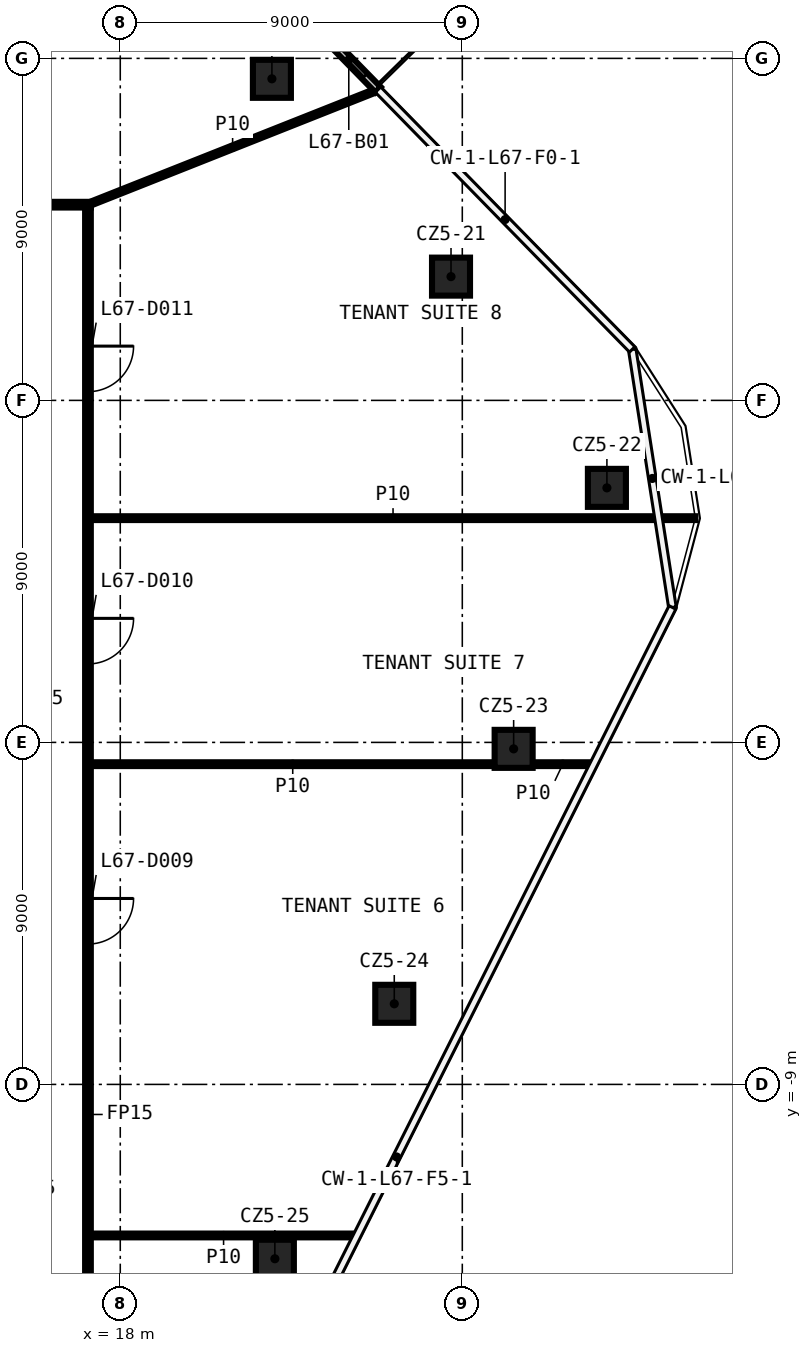
"""IFC4 building model, lengths in metres.
Left out: names, types, materials, properties, quantities, classifications, styles, units other than length and angle.
Written with IfcOpenShell. Run it as: python <this file> out.ifc"""

import sys

from ifc_helpers import new_model, si_unit, direction, frame, frame_2d, origin, origin_2d, place, context, subcontext, project, spatial, rectangle, extrude, element, fill, save


model = new_model("IFC4")
c1 = context("Model", 3, precision=1e-05, world=origin(), true_north=direction((0.0, 1.0)))
c2 = subcontext(c1, "Body", "Model", "MODEL_VIEW")
j1 = project(units=[si_unit("LENGTHUNIT", "METRE"), si_unit("PLANEANGLEUNIT", "RADIAN")], contexts=[c1])
p1 = place(None, origin())
s1 = spatial("IfcSite", under=j1, at=p1, CompositionType="ELEMENT")
p2 = place(p1, origin())
s2 = spatial("IfcBuilding", under=s1, at=p2, CompositionType="ELEMENT")
p3 = place(p2, frame((0.0, 0.0, 315.2)))
s3 = spatial("IfcBuildingStorey", under=s2, at=p3, CompositionType="ELEMENT", Elevation=315.2)
for number, where, z_axis, x_axis in (
    (1, (21.99, 17.462, 0.0), (0.0, 0.0, 1.0), (1.0, 0.0, 0.0)),
    (2, (26.703, 12.257, 0.0), (0.0, 0.0, 1.0), (1.0, 0.0, 0.0)),
    (3, (30.805, 6.698, 0.0), (0.0, 0.0, 1.0), (1.0, 0.0, 0.0)),
    (4, (28.351, -0.17, 0.0), (0.0, 0.0, 1.0), (1.0, 0.0, 0.0)),
    (5, (25.21, -6.879, 0.0), (0.0, 0.0, 1.0), (1.0, 0.0, 0.0)),
    (6, (22.068, -13.588, 0.0), (0.0, 0.0, 1.0), (1.0, 0.0, 0.0)),
):
    element("IfcColumn", number, at=place(p3, frame(where, z_axis=z_axis, x_axis=x_axis)), inside=s3, PredefinedType="COLUMN", context=c2, shape_type="SweptSolid", body=[
        extrude(rectangle(XDim=1.0, YDim=1.0, at=origin_2d()), origin(), (0.0, 0.0, 1.0), 3.82),
    ])
p4 = place(p3, frame((17.225, -12.975, 0.0), z_axis=(0.0, 0.0, 1.0), x_axis=(1.0, 0.0, 0.0)))
e7 = element("IfcWall", 7, at=p4, inside=s3, PredefinedType="PARTITIONING", context=c2, shape_type="SweptSolid", body=[
    extrude(rectangle(XDim=6.987, YDim=0.1, at=frame_2d((3.493, 0.0))), origin(), (0.0, 0.0, 1.0), 3.82),
])
p5 = place(p3, frame((17.225, -0.573, 0.0), z_axis=(0.0, 0.0, 1.0), x_axis=(1.0, 0.0, 0.0)))
e8 = element("IfcWall", 8, at=p5, inside=s3, PredefinedType="PARTITIONING", context=c2, shape_type="SweptSolid", body=[
    extrude(rectangle(XDim=10.626, YDim=0.1, at=frame_2d((5.313, 0.0))), origin(), (0.0, 0.0, 1.0), 3.82),
])
p6 = place(p3, frame((28.851, -0.573, 0.0), z_axis=(0.0, 0.0, 1.0), x_axis=(1.0, 0.0, 0.0)))
e9 = element("IfcWall", 9, at=p6, inside=s3, PredefinedType="PARTITIONING", context=c2, shape_type="SweptSolid", body=[
    extrude(rectangle(XDim=1.586, YDim=0.1, at=frame_2d((0.793, 0.0))), origin(), (0.0, 0.0, 1.0), 3.82),
])
p7 = place(p3, frame((17.225, 5.901, 0.0), z_axis=(0.0, 0.0, 1.0), x_axis=(1.0, 0.0, 0.0)))
e10 = element("IfcWall", 10, at=p7, inside=s3, PredefinedType="PARTITIONING", context=c2, shape_type="SweptSolid", body=[
    extrude(rectangle(XDim=15.905, YDim=0.1, at=frame_2d((7.953, 0.0))), origin(), (0.0, 0.0, 1.0), 3.82),
])
p8 = place(p3, frame((-17.225, 14.15, 0.0), z_axis=(0.0, 0.0, 1.0), x_axis=(1.0, 0.0, 0.0)))
e11 = element("IfcWall", 11, at=p8, inside=s3, PredefinedType="PARTITIONING", context=c2, shape_type="SweptSolid", body=[
    extrude(rectangle(XDim=34.45, YDim=0.15, at=frame_2d((17.225, 0.0))), origin(), (0.0, 0.0, 1.0), 3.82),
])
p9 = place(p8, frame((31.607, 0.0, 0.0)))
e12 = element("IfcOpeningElement", 12, at=p9, cuts=e11, PredefinedType="OPENING", context=c2, shape_type="SweptSolid", body=[
    extrude(rectangle(XDim=1.2, YDim=2.1, at=frame_2d((0.6, 1.05))), frame((0.0, 0.085, 0.0), z_axis=(0.0, -1.0, 0.0), x_axis=(1.0, 0.0, 0.0)), (0.0, 0.0, 1.0), 0.17),
])
p10 = place(p8, frame((25.936, 0.0, 0.0)))
e13 = element("IfcOpeningElement", 13, at=p10, cuts=e11, PredefinedType="OPENING", context=c2, shape_type="SweptSolid", body=[
    extrude(rectangle(XDim=1.2, YDim=2.1, at=frame_2d((0.6, 1.05))), frame((0.0, 0.085, 0.0), z_axis=(0.0, -1.0, 0.0), x_axis=(1.0, 0.0, 0.0)), (0.0, 0.0, 1.0), 0.17),
])
p11 = place(p8, frame((17.707, 0.0, 0.0)))
e14 = element("IfcOpeningElement", 14, at=p11, cuts=e11, PredefinedType="OPENING", context=c2, shape_type="SweptSolid", body=[
    extrude(rectangle(XDim=1.2, YDim=2.1, at=frame_2d((0.6, 1.05))), frame((0.0, 0.085, 0.0), z_axis=(0.0, -1.0, 0.0), x_axis=(1.0, 0.0, 0.0)), (0.0, 0.0, 1.0), 0.17),
])
p12 = place(p8, frame((10.617, 0.0, 0.0)))
e15 = element("IfcOpeningElement", 15, at=p12, cuts=e11, PredefinedType="OPENING", context=c2, shape_type="SweptSolid", body=[
    extrude(rectangle(XDim=1.2, YDim=2.1, at=frame_2d((0.6, 1.05))), frame((0.0, 0.085, 0.0), z_axis=(0.0, -1.0, 0.0), x_axis=(1.0, 0.0, 0.0)), (0.0, 0.0, 1.0), 0.17),
])
p13 = place(p8, frame((5.896, 0.0, 0.0)))
e16 = element("IfcOpeningElement", 16, at=p13, cuts=e11, PredefinedType="OPENING", context=c2, shape_type="SweptSolid", body=[
    extrude(rectangle(XDim=1.2, YDim=2.1, at=frame_2d((0.6, 1.05))), frame((0.0, 0.085, 0.0), z_axis=(0.0, -1.0, 0.0), x_axis=(1.0, 0.0, 0.0)), (0.0, 0.0, 1.0), 0.17),
])
p14 = place(p8, frame((1.506, 0.0, 0.0)))
e17 = element("IfcOpeningElement", 17, at=p14, cuts=e11, PredefinedType="OPENING", context=c2, shape_type="SweptSolid", body=[
    extrude(rectangle(XDim=1.2, YDim=2.1, at=frame_2d((0.6, 1.05))), frame((0.0, 0.085, 0.0), z_axis=(0.0, -1.0, 0.0), x_axis=(1.0, 0.0, 0.0)), (0.0, 0.0, 1.0), 0.17),
])
p15 = place(p3, frame((17.15, 14.15, 0.0), z_axis=(0.0, 0.0, 1.0), x_axis=(0.92958283513, 0.368613283308, 0.0)))
e18 = element("IfcWall", 18, at=p15, inside=s3, PredefinedType="PARTITIONING", context=c2, shape_type="SweptSolid", body=[
    extrude(rectangle(XDim=8.189, YDim=0.1, at=frame_2d((4.094, 0.0))), origin(), (0.0, 0.0, 1.0), 3.82),
])
p16 = place(p3, frame((17.15, 14.075, 0.0), z_axis=(0.0, 0.0, 1.0), x_axis=(0.0, -1.0, 0.0)))
e19 = element("IfcWall", 19, at=p16, inside=s3, PredefinedType="PARTITIONING", context=c2, shape_type="SweptSolid", body=[
    extrude(rectangle(XDim=28.15, YDim=0.15, at=frame_2d((14.075, 0.0))), origin(), (0.0, 0.0, 1.0), 3.82),
])
p17 = place(p16, frame((18.182, 0.0, 0.0)))
e20 = element("IfcOpeningElement", 20, at=p17, cuts=e19, PredefinedType="OPENING", context=c2, shape_type="SweptSolid", body=[
    extrude(rectangle(XDim=1.2, YDim=2.1, at=frame_2d((0.6, 1.05))), frame((0.0, 0.085, 0.0), z_axis=(0.0, -1.0, 0.0), x_axis=(1.0, 0.0, 0.0)), (0.0, 0.0, 1.0), 0.17),
])
p18 = place(p16, frame((10.811, 0.0, 0.0)))
e21 = element("IfcOpeningElement", 21, at=p18, cuts=e19, PredefinedType="OPENING", context=c2, shape_type="SweptSolid", body=[
    extrude(rectangle(XDim=1.2, YDim=2.1, at=frame_2d((0.6, 1.05))), frame((0.0, 0.085, 0.0), z_axis=(0.0, -1.0, 0.0), x_axis=(1.0, 0.0, 0.0)), (0.0, 0.0, 1.0), 0.17),
])
p19 = place(p16, frame((3.647, 0.0, 0.0)))
e22 = element("IfcOpeningElement", 22, at=p19, cuts=e19, PredefinedType="OPENING", context=c2, shape_type="SweptSolid", body=[
    extrude(rectangle(XDim=1.2, YDim=2.1, at=frame_2d((0.6, 1.05))), frame((0.0, 0.085, 0.0), z_axis=(0.0, -1.0, 0.0), x_axis=(1.0, 0.0, 0.0)), (0.0, 0.0, 1.0), 0.17),
])
p20 = place(p3, frame((24.782, 17.177, 0.0), z_axis=(0.0, 0.0, 1.0), x_axis=(-0.699351369698, 0.714778050657, 0.0)))
e23 = element("IfcWall", 23, at=p20, inside=s3, PredefinedType="SOLIDWALL", context=c2, shape_type="SweptSolid", body=[
    extrude(rectangle(XDim=9.575, YDim=0.2, at=frame_2d((4.787, 0.0))), origin(), (0.0, 0.0, 1.0), 3.82),
])
p21 = place(p20, frame((2.0, 0.0, 0.6)))
e24 = element("IfcOpeningElement", 24, at=p21, cuts=e23, PredefinedType="OPENING", context=c2, shape_type="SweptSolid", body=[
    extrude(rectangle(XDim=1.6, YDim=2.4, at=frame_2d((0.8, 1.2))), frame((0.0, 0.11, 0.0), z_axis=(0.0, -1.0, 0.0), x_axis=(1.0, 0.0, 0.0)), (0.0, 0.0, 1.0), 0.22),
])
p22 = place(p20, frame((0.5, 0.0, 0.0)))
e25 = element("IfcOpeningElement", 25, at=p22, cuts=e23, PredefinedType="OPENING", context=c2, shape_type="SweptSolid", body=[
    extrude(rectangle(XDim=1.2, YDim=2.4, at=frame_2d((0.6, 1.2))), frame((0.0, 0.11, 0.0), z_axis=(0.0, -1.0, 0.0), x_axis=(1.0, 0.0, 0.0)), (0.0, 0.0, 1.0), 0.22),
])
p23 = place(p20, frame((6.787, 0.0, 0.6)))
e26 = element("IfcOpeningElement", 26, at=p23, cuts=e23, PredefinedType="OPENING", context=c2, shape_type="SweptSolid", body=[
    extrude(rectangle(XDim=1.6, YDim=2.4, at=frame_2d((0.8, 1.2))), frame((0.0, 0.11, 0.0), z_axis=(0.0, -1.0, 0.0), x_axis=(1.0, 0.0, 0.0)), (0.0, 0.0, 1.0), 0.22),
])
p24 = place(p20, frame((5.287, 0.0, 0.0)))
e27 = element("IfcOpeningElement", 27, at=p24, cuts=e23, PredefinedType="OPENING", context=c2, shape_type="SweptSolid", body=[
    extrude(rectangle(XDim=1.2, YDim=2.4, at=frame_2d((0.6, 1.2))), frame((0.0, 0.11, 0.0), z_axis=(0.0, -1.0, 0.0), x_axis=(1.0, 0.0, 0.0)), (0.0, 0.0, 1.0), 0.22),
])
p25 = place(p17, origin())
e28 = element("IfcDoor", 28, at=p25, inside=s3, OperationType="SINGLE_SWING_RIGHT", PredefinedType="DOOR", context=c2, shape_type="SweptSolid", body=[
    extrude(rectangle(XDim=1.2, YDim=2.1, at=frame_2d((0.6, 1.05))), frame((0.0, 0.025, 0.0), z_axis=(0.0, -1.0, 0.0), x_axis=(1.0, 0.0, 0.0)), (0.0, 0.0, 1.0), 0.05),
])
fill(e20, e28)
p26 = place(p18, origin())
e29 = element("IfcDoor", 29, at=p26, inside=s3, OperationType="SINGLE_SWING_LEFT", PredefinedType="DOOR", context=c2, shape_type="SweptSolid", body=[
    extrude(rectangle(XDim=1.2, YDim=2.1, at=frame_2d((0.6, 1.05))), frame((0.0, 0.025, 0.0), z_axis=(0.0, -1.0, 0.0), x_axis=(1.0, 0.0, 0.0)), (0.0, 0.0, 1.0), 0.05),
])
fill(e21, e29)
p27 = place(p19, origin())
e30 = element("IfcDoor", 30, at=p27, inside=s3, OperationType="SINGLE_SWING_RIGHT", PredefinedType="DOOR", context=c2, shape_type="SweptSolid", body=[
    extrude(rectangle(XDim=1.2, YDim=2.1, at=frame_2d((0.6, 1.05))), frame((0.0, 0.025, 0.0), z_axis=(0.0, -1.0, 0.0), x_axis=(1.0, 0.0, 0.0)), (0.0, 0.0, 1.0), 0.05),
])
fill(e22, e30)
p28 = place(p22, origin())
e31 = element("IfcDoor", 31, at=p28, inside=s3, OperationType="SLIDING_TO_LEFT", PredefinedType="DOOR", context=c2, shape_type="SweptSolid", body=[
    extrude(rectangle(XDim=1.2, YDim=2.4, at=frame_2d((0.6, 1.2))), frame((0.0, 0.025, 0.0), z_axis=(0.0, -1.0, 0.0), x_axis=(1.0, 0.0, 0.0)), (0.0, 0.0, 1.0), 0.05),
])
fill(e25, e31)
save(model, sys.argv[1])
